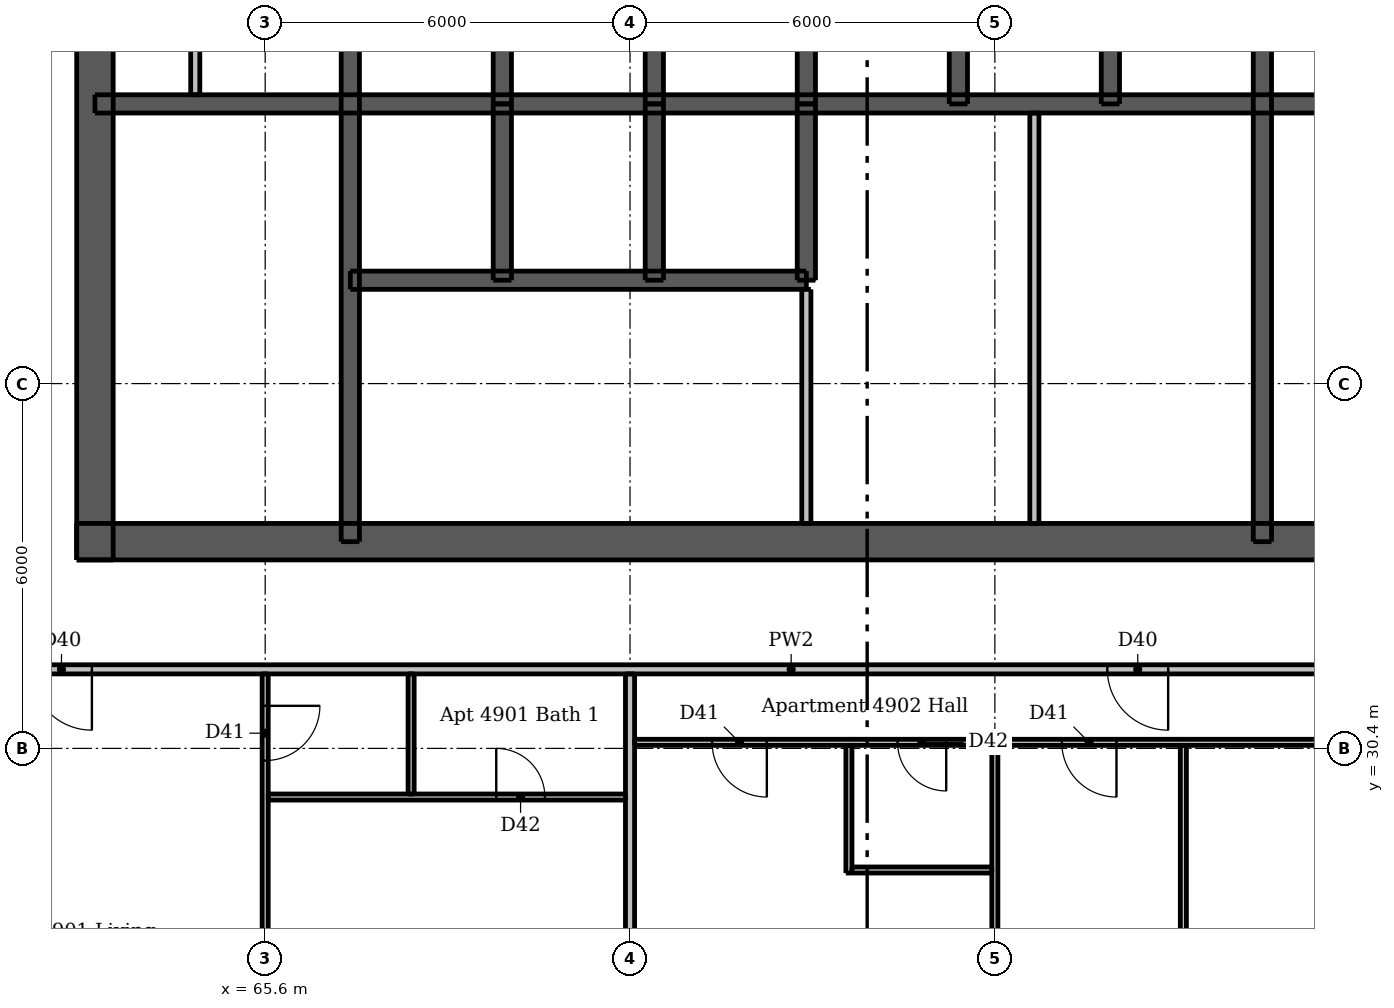
"""IFC4 building model, lengths in metres.
Left out: names, types, materials, properties, quantities, classifications, styles, units other than length and angle.
Written with IfcOpenShell. Run it as: python <this file> out.ifc"""

import sys

from ifc_helpers import new_model, si_unit, direction, frame, frame_2d, origin, place, context, subcontext, project, spatial, rectangle, extrude, element, fill, save


model = new_model("IFC4")
c1 = context("Model", 3, precision=1e-05, world=origin(), true_north=direction((0.0, 1.0)))
c2 = subcontext(c1, "Body", "Model", "MODEL_VIEW")
j1 = project(units=[si_unit("LENGTHUNIT", "METRE"), si_unit("PLANEANGLEUNIT", "RADIAN")], contexts=[c1])
p1 = place(None, origin())
s1 = spatial("IfcSite", under=j1, at=p1, CompositionType="ELEMENT")
p2 = place(p1, origin())
s2 = spatial("IfcBuilding", under=s1, at=p2, CompositionType="ELEMENT")
p3 = place(p2, frame((0.0, 0.0, 187.0)))
s3 = spatial("IfcBuildingStorey", under=s2, at=p3, CompositionType="ELEMENT", Elevation=187.0)
p4 = place(p3, frame((62.5, 33.8, 0.0), z_axis=(0.0, 0.0, 1.0), x_axis=(1.0, 0.0, 0.0)))
e1 = element("IfcWall", 1, at=p4, inside=s3, PredefinedType="SHEAR", context=c2, shape_type="SweptSolid", body=[
    extrude(rectangle(XDim=24.0, YDim=0.6, at=frame_2d((12.0, 0.0))), origin(), (0.0, 0.0, 1.0), 3.05),
])
p5 = place(p4, frame((1.925, 0.0, 0.0)))
e2 = element("IfcOpeningElement", 2, at=p5, cuts=e1, PredefinedType="OPENING", context=c2, shape_type="SweptSolid", body=[
    extrude(rectangle(XDim=1.1, YDim=2.1, at=frame_2d((0.55, 1.05))), frame((0.0, 0.31, 0.0), z_axis=(0.0, -1.0, 0.0), x_axis=(1.0, 0.0, 0.0)), (0.0, 0.0, 1.0), 0.62),
])
p6 = place(p4, frame((20.975, 0.0, 0.0)))
e3 = element("IfcOpeningElement", 3, at=p6, cuts=e1, PredefinedType="OPENING", context=c2, shape_type="SweptSolid", body=[
    extrude(rectangle(XDim=1.1, YDim=2.1, at=frame_2d((0.55, 1.05))), frame((0.0, 0.31, 0.0), z_axis=(0.0, -1.0, 0.0), x_axis=(1.0, 0.0, 0.0)), (0.0, 0.0, 1.0), 0.62),
])
p7 = place(p4, frame((8.0, 0.0, 0.0)))
e4 = element("IfcOpeningElement", 4, at=p7, cuts=e1, PredefinedType="OPENING", context=c2, shape_type="SweptSolid", body=[
    extrude(rectangle(XDim=1.1, YDim=2.1, at=frame_2d((0.55, 1.05))), frame((0.0, 0.31, 0.0), z_axis=(0.0, -1.0, 0.0), x_axis=(1.0, 0.0, 0.0)), (0.0, 0.0, 1.0), 0.62),
])
p8 = place(p4, frame((13.5, 0.0, 0.0)))
e5 = element("IfcOpeningElement", 5, at=p8, cuts=e1, PredefinedType="OPENING", context=c2, shape_type="SweptSolid", body=[
    extrude(rectangle(XDim=0.9, YDim=2.1, at=frame_2d((0.45, 1.05))), frame((0.0, 0.31, 0.0), z_axis=(0.0, -1.0, 0.0), x_axis=(1.0, 0.0, 0.0)), (0.0, 0.0, 1.0), 0.62),
])
p9 = place(p4, frame((17.1, 0.0, 0.0)))
e6 = element("IfcOpeningElement", 6, at=p9, cuts=e1, PredefinedType="OPENING", context=c2, shape_type="SweptSolid", body=[
    extrude(rectangle(XDim=0.9, YDim=2.1, at=frame_2d((0.45, 1.05))), frame((0.0, 0.31, 0.0), z_axis=(0.0, -1.0, 0.0), x_axis=(1.0, 0.0, 0.0)), (0.0, 0.0, 1.0), 0.62),
])
p10 = place(p3, frame((62.8, 33.5, 0.0), z_axis=(0.0, 0.0, 1.0), x_axis=(0.0, 1.0, 0.0)))
e7 = element("IfcWall", 7, at=p10, inside=s3, PredefinedType="SHEAR", context=c2, shape_type="SweptSolid", body=[
    extrude(rectangle(XDim=24.0, YDim=0.6, at=frame_2d((12.0, 0.0))), origin(), (0.0, 0.0, 1.0), 3.05),
])
p11 = place(p10, frame((11.2, 0.0, 0.0)))
e8 = element("IfcOpeningElement", 8, at=p11, cuts=e7, PredefinedType="OPENING", context=c2, shape_type="SweptSolid", body=[
    extrude(rectangle(XDim=1.6, YDim=2.1, at=frame_2d((0.8, 1.05))), frame((0.0, 0.31, 0.0), z_axis=(0.0, -1.0, 0.0), x_axis=(1.0, 0.0, 0.0)), (0.0, 0.0, 1.0), 0.62),
])
p12 = place(p3, frame((62.8, 41.0, 0.0), z_axis=(0.0, 0.0, 1.0), x_axis=(1.0, 0.0, 0.0)))
e9 = element("IfcWall", 9, at=p12, inside=s3, PredefinedType="SHEAR", context=c2, shape_type="SweptSolid", body=[
    extrude(rectangle(XDim=23.4, YDim=0.3, at=frame_2d((11.7, 0.0))), origin(), (0.0, 0.0, 1.0), 3.05),
])
p13 = place(p3, frame((67.0, 33.8, 0.0), z_axis=(0.0, 0.0, 1.0), x_axis=(0.0, 1.0, 0.0)))
e10 = element("IfcWall", 10, at=p13, inside=s3, PredefinedType="SHEAR", context=c2, shape_type="SweptSolid", body=[
    extrude(rectangle(XDim=10.1, YDim=0.3, at=frame_2d((5.05, 0.0))), origin(), (0.0, 0.0, 1.0), 3.05),
])
p14 = place(p13, frame((0.5, 0.0, 0.0)))
e11 = element("IfcOpeningElement", 11, at=p14, cuts=e10, PredefinedType="OPENING", context=c2, shape_type="SweptSolid", body=[
    extrude(rectangle(XDim=1.1, YDim=2.1, at=frame_2d((0.55, 1.05))), frame((0.0, 0.16, 0.0), z_axis=(0.0, -1.0, 0.0), x_axis=(1.0, 0.0, 0.0)), (0.0, 0.0, 1.0), 0.32),
])
p15 = place(p3, frame((82.0, 33.8, 0.0), z_axis=(0.0, 0.0, 1.0), x_axis=(0.0, 1.0, 0.0)))
e12 = element("IfcWall", 12, at=p15, inside=s3, PredefinedType="SHEAR", context=c2, shape_type="SweptSolid", body=[
    extrude(rectangle(XDim=10.1, YDim=0.3, at=frame_2d((5.05, 0.0))), origin(), (0.0, 0.0, 1.0), 3.05),
])
for number, where, z_axis, x_axis in (
    (13, (69.5, 41.0, 0.0), (0.0, 0.0, 1.0), (0.0, 1.0, 0.0)),
    (14, (72.0, 41.0, 0.0), (0.0, 0.0, 1.0), (0.0, 1.0, 0.0)),
    (15, (74.5, 41.0, 0.0), (0.0, 0.0, 1.0), (0.0, 1.0, 0.0)),
    (16, (77.0, 41.0, 0.0), (0.0, 0.0, 1.0), (0.0, 1.0, 0.0)),
    (17, (79.5, 41.0, 0.0), (0.0, 0.0, 1.0), (0.0, 1.0, 0.0)),
):
    element("IfcWall", number, at=place(p3, frame(where, z_axis=z_axis, x_axis=x_axis)), inside=s3, PredefinedType="SHEAR", context=c2, shape_type="SweptSolid", body=[
        extrude(rectangle(XDim=2.9, YDim=0.3, at=frame_2d((1.45, 0.0))), origin(), (0.0, 0.0, 1.0), 3.05),
    ])
p16 = place(p3, frame((67.0, 38.1, 0.0), z_axis=(0.0, 0.0, 1.0), x_axis=(1.0, 0.0, 0.0)))
e18 = element("IfcWall", 18, at=p16, inside=s3, PredefinedType="SHEAR", context=c2, shape_type="SweptSolid", body=[
    extrude(rectangle(XDim=7.5, YDim=0.3, at=frame_2d((3.75, 0.0))), origin(), (0.0, 0.0, 1.0), 3.05),
])
p17 = place(p16, frame((0.7, 0.0, 0.0)))
e19 = element("IfcOpeningElement", 19, at=p17, cuts=e18, PredefinedType="OPENING", context=c2, shape_type="SweptSolid", body=[
    extrude(rectangle(XDim=1.1, YDim=2.1, at=frame_2d((0.55, 1.05))), frame((0.0, 0.16, 0.0), z_axis=(0.0, -1.0, 0.0), x_axis=(1.0, 0.0, 0.0)), (0.0, 0.0, 1.0), 0.32),
])
p18 = place(p16, frame((3.2, 0.0, 0.0)))
e20 = element("IfcOpeningElement", 20, at=p18, cuts=e18, PredefinedType="OPENING", context=c2, shape_type="SweptSolid", body=[
    extrude(rectangle(XDim=1.1, YDim=2.1, at=frame_2d((0.55, 1.05))), frame((0.0, 0.16, 0.0), z_axis=(0.0, -1.0, 0.0), x_axis=(1.0, 0.0, 0.0)), (0.0, 0.0, 1.0), 0.32),
])
p19 = place(p16, frame((5.65, 0.0, 0.0)))
e21 = element("IfcOpeningElement", 21, at=p19, cuts=e18, PredefinedType="OPENING", context=c2, shape_type="SweptSolid", body=[
    extrude(rectangle(XDim=1.2, YDim=2.1, at=frame_2d((0.6, 1.05))), frame((0.0, 0.16, 0.0), z_axis=(0.0, -1.0, 0.0), x_axis=(1.0, 0.0, 0.0)), (0.0, 0.0, 1.0), 0.32),
])
for number, where, z_axis, x_axis in (
    (22, (69.5, 38.1, 0.0), (0.0, 0.0, 1.0), (0.0, 1.0, 0.0)),
    (23, (72.0, 38.1, 0.0), (0.0, 0.0, 1.0), (0.0, 1.0, 0.0)),
    (24, (74.5, 38.1, 0.0), (0.0, 0.0, 1.0), (0.0, 1.0, 0.0)),
):
    element("IfcWall", number, at=place(p3, frame(where, z_axis=z_axis, x_axis=x_axis)), inside=s3, PredefinedType="SHEAR", context=c2, shape_type="SweptSolid", body=[
        extrude(rectangle(XDim=2.9, YDim=0.3, at=frame_2d((1.45, 0.0))), origin(), (0.0, 0.0, 1.0), 3.05),
    ])
p20 = place(p3, frame((74.5, 34.1, 0.0), z_axis=(0.0, 0.0, 1.0), x_axis=(0.0, 1.0, 0.0)))
e25 = element("IfcWall", 25, at=p20, inside=s3, PredefinedType="PLUMBINGWALL", context=c2, shape_type="SweptSolid", body=[
    extrude(rectangle(XDim=3.85, YDim=0.15, at=frame_2d((1.925, 0.0))), origin(), (0.0, 0.0, 1.0), 3.05),
])
p21 = place(p3, frame((78.25, 34.1, 0.0), z_axis=(0.0, 0.0, 1.0), x_axis=(0.0, 1.0, 0.0)))
e26 = element("IfcWall", 26, at=p21, inside=s3, PredefinedType="PLUMBINGWALL", context=c2, shape_type="SweptSolid", body=[
    extrude(rectangle(XDim=6.75, YDim=0.15, at=frame_2d((3.375, 0.0))), origin(), (0.0, 0.0, 1.0), 3.05),
])
p22 = place(p3, frame((64.45, 41.15, 0.0), z_axis=(0.0, 0.0, 1.0), x_axis=(0.0, 1.0, 0.0)))
e27 = element("IfcWall", 27, at=p22, inside=s3, PredefinedType="PLUMBINGWALL", context=c2, shape_type="SweptSolid", body=[
    extrude(rectangle(XDim=2.6, YDim=0.15, at=frame_2d((1.3, 0.0))), origin(), (0.0, 0.0, 1.0), 3.05),
])
p23 = place(p3, frame((65.6, 31.625, 0.0), z_axis=(0.0, 0.0, 1.0), x_axis=(0.0, -1.0, 0.0)))
e28 = element("IfcWall", 28, at=p23, inside=s3, PredefinedType="PARTITIONING", context=c2, shape_type="SweptSolid", body=[
    extrude(rectangle(XDim=9.125, YDim=0.1, at=frame_2d((4.562, 0.0))), origin(), (0.0, 0.0, 1.0), 2.516),
])
p24 = place(p23, frame((0.525, 0.0, 0.0)))
e29 = element("IfcOpeningElement", 29, at=p24, cuts=e28, PredefinedType="OPENING", context=c2, shape_type="SweptSolid", body=[
    extrude(rectangle(XDim=0.9, YDim=2.1, at=frame_2d((0.45, 1.05))), frame((0.0, 0.06, 0.0), z_axis=(0.0, -1.0, 0.0), x_axis=(1.0, 0.0, 0.0)), (0.0, 0.0, 1.0), 0.12),
])
p25 = place(p23, frame((5.125, 0.0, 0.0)))
e30 = element("IfcOpeningElement", 30, at=p25, cuts=e28, PredefinedType="OPENING", context=c2, shape_type="SweptSolid", body=[
    extrude(rectangle(XDim=0.9, YDim=2.1, at=frame_2d((0.45, 1.05))), frame((0.0, 0.06, 0.0), z_axis=(0.0, -1.0, 0.0), x_axis=(1.0, 0.0, 0.0)), (0.0, 0.0, 1.0), 0.12),
])
p26 = place(p3, frame((68.0, 29.65, 0.0), z_axis=(0.0, 0.0, 1.0), x_axis=(0.0, 1.0, 0.0)))
e31 = element("IfcWall", 31, at=p26, inside=s3, PredefinedType="PARTITIONING", context=c2, shape_type="SweptSolid", body=[
    extrude(rectangle(XDim=1.975, YDim=0.1, at=frame_2d((0.988, 0.0))), origin(), (0.0, 0.0, 1.0), 3.05),
])
p27 = place(p3, frame((75.2, 28.35, 0.0), z_axis=(0.0, 0.0, 1.0), x_axis=(0.0, 1.0, 0.0)))
e32 = element("IfcWall", 32, at=p27, inside=s3, PredefinedType="PARTITIONING", context=c2, shape_type="SweptSolid", body=[
    extrude(rectangle(XDim=2.1, YDim=0.1, at=frame_2d((1.05, 0.0))), origin(), (0.0, 0.0, 1.0), 3.05),
])
p28 = place(p3, frame((77.6, 24.0, 0.0), z_axis=(0.0, 0.0, 1.0), x_axis=(0.0, 1.0, 0.0)))
e33 = element("IfcWall", 33, at=p28, inside=s3, PredefinedType="PARTITIONING", context=c2, shape_type="SweptSolid", body=[
    extrude(rectangle(XDim=6.45, YDim=0.1, at=frame_2d((3.225, 0.0))), origin(), (0.0, 0.0, 1.0), 2.59),
])
p29 = place(p3, frame((80.7, 24.0, 0.0), z_axis=(0.0, 0.0, 1.0), x_axis=(0.0, 1.0, 0.0)))
e34 = element("IfcWall", 34, at=p29, inside=s3, PredefinedType="PARTITIONING", context=c2, shape_type="SweptSolid", body=[
    extrude(rectangle(XDim=6.45, YDim=0.1, at=frame_2d((3.225, 0.0))), origin(), (0.0, 0.0, 1.0), 3.05),
])
p30 = place(p3, frame((88.25, 30.5, 0.0), z_axis=(0.0, 0.0, 1.0), x_axis=(-1.0, 0.0, 0.0)))
e35 = element("IfcWall", 35, at=p30, inside=s3, PredefinedType="PARTITIONING", context=c2, shape_type="SweptSolid", body=[
    extrude(rectangle(XDim=16.575, YDim=0.1, at=frame_2d((8.288, 0.0))), origin(), (0.0, 0.0, 1.0), 3.05),
])
p31 = place(p30, frame((4.15, 0.0, 0.0)))
e36 = element("IfcOpeningElement", 36, at=p31, cuts=e35, PredefinedType="OPENING", context=c2, shape_type="SweptSolid", body=[
    extrude(rectangle(XDim=0.9, YDim=2.1, at=frame_2d((0.45, 1.05))), frame((0.0, 0.06, 0.0), z_axis=(0.0, -1.0, 0.0), x_axis=(1.0, 0.0, 0.0)), (0.0, 0.0, 1.0), 0.12),
])
p32 = place(p30, frame((0.35, 0.0, 0.0)))
e37 = element("IfcOpeningElement", 37, at=p32, cuts=e35, PredefinedType="OPENING", context=c2, shape_type="SweptSolid", body=[
    extrude(rectangle(XDim=0.9, YDim=2.1, at=frame_2d((0.45, 1.05))), frame((0.0, 0.06, 0.0), z_axis=(0.0, -1.0, 0.0), x_axis=(1.0, 0.0, 0.0)), (0.0, 0.0, 1.0), 0.12),
])
p33 = place(p30, frame((14.4, 0.0, 0.0)))
e38 = element("IfcOpeningElement", 38, at=p33, cuts=e35, PredefinedType="OPENING", context=c2, shape_type="SweptSolid", body=[
    extrude(rectangle(XDim=0.9, YDim=2.1, at=frame_2d((0.45, 1.05))), frame((0.0, 0.06, 0.0), z_axis=(0.0, -1.0, 0.0), x_axis=(1.0, 0.0, 0.0)), (0.0, 0.0, 1.0), 0.12),
])
p34 = place(p30, frame((8.65, 0.0, 0.0)))
e39 = element("IfcOpeningElement", 39, at=p34, cuts=e35, PredefinedType="OPENING", context=c2, shape_type="SweptSolid", body=[
    extrude(rectangle(XDim=0.9, YDim=2.1, at=frame_2d((0.45, 1.05))), frame((0.0, 0.06, 0.0), z_axis=(0.0, -1.0, 0.0), x_axis=(1.0, 0.0, 0.0)), (0.0, 0.0, 1.0), 0.12),
])
p35 = place(p30, frame((11.45, 0.0, 0.0)))
e40 = element("IfcOpeningElement", 40, at=p35, cuts=e35, PredefinedType="OPENING", context=c2, shape_type="SweptSolid", body=[
    extrude(rectangle(XDim=0.8, YDim=2.1, at=frame_2d((0.4, 1.05))), frame((0.0, 0.06, 0.0), z_axis=(0.0, -1.0, 0.0), x_axis=(1.0, 0.0, 0.0)), (0.0, 0.0, 1.0), 0.12),
])
p36 = place(p3, frame((65.65, 29.6, 0.0), z_axis=(0.0, 0.0, 1.0), x_axis=(1.0, 0.0, 0.0)))
e41 = element("IfcWall", 41, at=p36, inside=s3, PredefinedType="PARTITIONING", context=c2, shape_type="SweptSolid", body=[
    extrude(rectangle(XDim=5.875, YDim=0.1, at=frame_2d((2.938, 0.0))), origin(), (0.0, 0.0, 1.0), 3.05),
])
p37 = place(p36, frame((3.75, 0.0, 0.0)))
e42 = element("IfcOpeningElement", 42, at=p37, cuts=e41, PredefinedType="OPENING", context=c2, shape_type="SweptSolid", body=[
    extrude(rectangle(XDim=0.8, YDim=2.1, at=frame_2d((0.4, 1.05))), frame((0.0, 0.06, 0.0), z_axis=(0.0, -1.0, 0.0), x_axis=(1.0, 0.0, 0.0)), (0.0, 0.0, 1.0), 0.12),
])
p38 = place(p3, frame((75.25, 28.4, 0.0), z_axis=(0.0, 0.0, 1.0), x_axis=(1.0, 0.0, 0.0)))
e43 = element("IfcWall", 43, at=p38, inside=s3, PredefinedType="PARTITIONING", context=c2, shape_type="SweptSolid", body=[
    extrude(rectangle(XDim=2.3, YDim=0.1, at=frame_2d((1.15, 0.0))), origin(), (0.0, 0.0, 1.0), 3.05),
])
p39 = place(p3, frame((71.6, 22.5, 0.0), z_axis=(0.0, 0.0, 1.0), x_axis=(0.0, 1.0, 0.0)))
e44 = element("IfcWall", 44, at=p39, inside=s3, PredefinedType="PARTITIONING", context=c2, shape_type="SweptSolid", body=[
    extrude(rectangle(XDim=9.125, YDim=0.15, at=frame_2d((4.562, 0.0))), origin(), (0.0, 0.0, 1.0), 2.516),
])
p40 = place(p3, frame((89.525, 31.7, 0.0), z_axis=(0.0, 0.0, 1.0), x_axis=(-1.0, 0.0, 0.0)))
e45 = element("IfcWall", 45, at=p40, inside=s3, PredefinedType="PARTITIONING", context=c2, shape_type="SweptSolid", body=[
    extrude(rectangle(XDim=30.55, YDim=0.15, at=frame_2d((15.275, 0.0))), origin(), (0.0, 0.0, 1.0), 3.05),
])
p41 = place(p40, frame((26.775, 0.0, 0.0)))
e46 = element("IfcOpeningElement", 46, at=p41, cuts=e45, PredefinedType="OPENING", context=c2, shape_type="SweptSolid", body=[
    extrude(rectangle(XDim=1.0, YDim=2.1, at=frame_2d((0.5, 1.05))), frame((0.0, 0.085, 0.0), z_axis=(0.0, -1.0, 0.0), x_axis=(1.0, 0.0, 0.0)), (0.0, 0.0, 1.0), 0.17),
])
p42 = place(p40, frame((9.075, 0.0, 0.0)))
e47 = element("IfcOpeningElement", 47, at=p42, cuts=e45, PredefinedType="OPENING", context=c2, shape_type="SweptSolid", body=[
    extrude(rectangle(XDim=1.0, YDim=2.1, at=frame_2d((0.5, 1.05))), frame((0.0, 0.085, 0.0), z_axis=(0.0, -1.0, 0.0), x_axis=(1.0, 0.0, 0.0)), (0.0, 0.0, 1.0), 0.17),
])
p43 = place(p5, origin())
e48 = element("IfcDoor", 48, at=p43, inside=s3, OperationType="SINGLE_SWING_LEFT", PredefinedType="DOOR", context=c2, shape_type="SweptSolid", body=[
    extrude(rectangle(XDim=1.1, YDim=2.1, at=frame_2d((0.55, 1.05))), frame((0.0, 0.288, 0.0), z_axis=(0.0, -1.0, 0.0), x_axis=(1.0, 0.0, 0.0)), (0.0, 0.0, 1.0), 0.05),
])
fill(e2, e48)
p44 = place(p7, origin())
e49 = element("IfcDoor", 49, at=p44, inside=s3, OperationType="SINGLE_SWING_LEFT", PredefinedType="DOOR", context=c2, shape_type="SweptSolid", body=[
    extrude(rectangle(XDim=1.1, YDim=2.1, at=frame_2d((0.55, 1.05))), frame((0.0, 0.288, 0.0), z_axis=(0.0, -1.0, 0.0), x_axis=(1.0, 0.0, 0.0)), (0.0, 0.0, 1.0), 0.05),
])
fill(e4, e49)
p45 = place(p14, origin())
e50 = element("IfcDoor", 50, at=p45, inside=s3, OperationType="SINGLE_SWING_RIGHT", PredefinedType="DOOR", context=c2, shape_type="SweptSolid", body=[
    extrude(rectangle(XDim=1.1, YDim=2.1, at=frame_2d((0.55, 1.05))), frame((0.0, -0.087, 0.0), z_axis=(0.0, -1.0, 0.0), x_axis=(1.0, 0.0, 0.0)), (0.0, 0.0, 1.0), 0.05),
])
fill(e11, e50)
p46 = place(p8, origin())
e51 = element("IfcDoor", 51, at=p46, inside=s3, OperationType="SINGLE_SWING_LEFT", PredefinedType="DOOR", context=c2, shape_type="SweptSolid", body=[
    extrude(rectangle(XDim=0.9, YDim=2.1, at=frame_2d((0.45, 1.05))), frame((0.0, 0.288, 0.0), z_axis=(0.0, -1.0, 0.0), x_axis=(1.0, 0.0, 0.0)), (0.0, 0.0, 1.0), 0.05),
])
fill(e5, e51)
p47 = place(p9, origin())
e52 = element("IfcDoor", 52, at=p47, inside=s3, OperationType="SINGLE_SWING_LEFT", PredefinedType="DOOR", context=c2, shape_type="SweptSolid", body=[
    extrude(rectangle(XDim=0.9, YDim=2.1, at=frame_2d((0.45, 1.05))), frame((0.0, 0.288, 0.0), z_axis=(0.0, -1.0, 0.0), x_axis=(1.0, 0.0, 0.0)), (0.0, 0.0, 1.0), 0.05),
])
fill(e6, e52)
p48 = place(p17, origin())
e53 = element("IfcDoor", 53, at=p48, inside=s3, OperationType="DOUBLE_DOOR_SLIDING", PredefinedType="DOOR", context=c2, shape_type="SweptSolid", body=[
    extrude(rectangle(XDim=1.1, YDim=2.1, at=frame_2d((0.55, 1.05))), frame((0.0, 0.025, 0.0), z_axis=(0.0, -1.0, 0.0), x_axis=(1.0, 0.0, 0.0)), (0.0, 0.0, 1.0), 0.05),
])
fill(e19, e53)
p49 = place(p18, origin())
e54 = element("IfcDoor", 54, at=p49, inside=s3, OperationType="DOUBLE_DOOR_SLIDING", PredefinedType="DOOR", context=c2, shape_type="SweptSolid", body=[
    extrude(rectangle(XDim=1.1, YDim=2.1, at=frame_2d((0.55, 1.05))), frame((0.0, 0.025, 0.0), z_axis=(0.0, -1.0, 0.0), x_axis=(1.0, 0.0, 0.0)), (0.0, 0.0, 1.0), 0.05),
])
fill(e20, e54)
p50 = place(p19, origin())
e55 = element("IfcDoor", 55, at=p50, inside=s3, OperationType="DOUBLE_DOOR_SLIDING", PredefinedType="DOOR", context=c2, shape_type="SweptSolid", body=[
    extrude(rectangle(XDim=1.2, YDim=2.1, at=frame_2d((0.6, 1.05))), frame((0.0, 0.025, 0.0), z_axis=(0.0, -1.0, 0.0), x_axis=(1.0, 0.0, 0.0)), (0.0, 0.0, 1.0), 0.05),
])
fill(e21, e55)
p51 = place(p41, origin())
e56 = element("IfcDoor", 56, at=p51, inside=s3, OperationType="SINGLE_SWING_LEFT", PredefinedType="DOOR", context=c2, shape_type="SweptSolid", body=[
    extrude(rectangle(XDim=1.0, YDim=2.1, at=frame_2d((0.5, 1.05))), frame((0.0, 0.025, 0.0), z_axis=(0.0, -1.0, 0.0), x_axis=(1.0, 0.0, 0.0)), (0.0, 0.0, 1.0), 0.05),
])
fill(e46, e56)
p52 = place(p24, origin())
e57 = element("IfcDoor", 57, at=p52, inside=s3, OperationType="SINGLE_SWING_LEFT", PredefinedType="DOOR", context=c2, shape_type="SweptSolid", body=[
    extrude(rectangle(XDim=0.9, YDim=2.1, at=frame_2d((0.45, 1.05))), frame((0.0, 0.025, 0.0), z_axis=(0.0, -1.0, 0.0), x_axis=(1.0, 0.0, 0.0)), (0.0, 0.0, 1.0), 0.05),
])
fill(e29, e57)
p53 = place(p37, origin())
e58 = element("IfcDoor", 58, at=p53, inside=s3, OperationType="SINGLE_SWING_LEFT", PredefinedType="DOOR", context=c2, shape_type="SweptSolid", body=[
    extrude(rectangle(XDim=0.8, YDim=2.1, at=frame_2d((0.4, 1.05))), frame((0.0, 0.025, 0.0), z_axis=(0.0, -1.0, 0.0), x_axis=(1.0, 0.0, 0.0)), (0.0, 0.0, 1.0), 0.05),
])
fill(e42, e58)
p54 = place(p42, origin())
e59 = element("IfcDoor", 59, at=p54, inside=s3, OperationType="SINGLE_SWING_LEFT", PredefinedType="DOOR", context=c2, shape_type="SweptSolid", body=[
    extrude(rectangle(XDim=1.0, YDim=2.1, at=frame_2d((0.5, 1.05))), frame((0.0, 0.025, 0.0), z_axis=(0.0, -1.0, 0.0), x_axis=(1.0, 0.0, 0.0)), (0.0, 0.0, 1.0), 0.05),
])
fill(e47, e59)
p55 = place(p33, origin())
e60 = element("IfcDoor", 60, at=p55, inside=s3, OperationType="SINGLE_SWING_LEFT", PredefinedType="DOOR", context=c2, shape_type="SweptSolid", body=[
    extrude(rectangle(XDim=0.9, YDim=2.1, at=frame_2d((0.45, 1.05))), frame((0.0, 0.025, 0.0), z_axis=(0.0, -1.0, 0.0), x_axis=(1.0, 0.0, 0.0)), (0.0, 0.0, 1.0), 0.05),
])
fill(e38, e60)
p56 = place(p34, origin())
e61 = element("IfcDoor", 61, at=p56, inside=s3, OperationType="SINGLE_SWING_LEFT", PredefinedType="DOOR", context=c2, shape_type="SweptSolid", body=[
    extrude(rectangle(XDim=0.9, YDim=2.1, at=frame_2d((0.45, 1.05))), frame((0.0, 0.025, 0.0), z_axis=(0.0, -1.0, 0.0), x_axis=(1.0, 0.0, 0.0)), (0.0, 0.0, 1.0), 0.05),
])
fill(e39, e61)
p57 = place(p35, origin())
e62 = element("IfcDoor", 62, at=p57, inside=s3, OperationType="SINGLE_SWING_LEFT", PredefinedType="DOOR", context=c2, shape_type="SweptSolid", body=[
    extrude(rectangle(XDim=0.8, YDim=2.1, at=frame_2d((0.4, 1.05))), frame((0.0, 0.025, 0.0), z_axis=(0.0, -1.0, 0.0), x_axis=(1.0, 0.0, 0.0)), (0.0, 0.0, 1.0), 0.05),
])
fill(e40, e62)
save(model, sys.argv[1])
